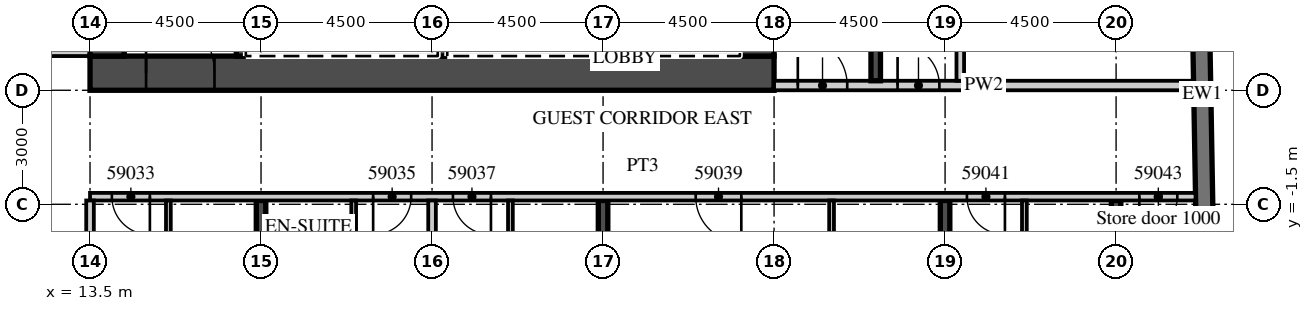
"""IFC4 building model, lengths in metres.
Left out: names, types, materials, properties, quantities, classifications, styles, units other than length and angle.
Written with IfcOpenShell. Run it as: python <this file> out.ifc"""

import sys

from ifc_helpers import new_model, si_unit, direction, frame, frame_2d, origin, place, context, subcontext, project, spatial, rectangle, extrude, element, fill, save


model = new_model("IFC4")
c1 = context("Model", 3, precision=1e-05, world=origin(), true_north=direction((0.0, 1.0)))
c2 = subcontext(c1, "Body", "Model", "MODEL_VIEW")
j1 = project(units=[si_unit("LENGTHUNIT", "METRE"), si_unit("PLANEANGLEUNIT", "RADIAN")], contexts=[c1])
p1 = place(None, origin())
s1 = spatial("IfcSite", under=j1, at=p1, CompositionType="ELEMENT")
p2 = place(p1, origin())
s2 = spatial("IfcBuilding", under=s1, at=p2, CompositionType="ELEMENT")
p3 = place(p2, frame((0.0, 0.0, 240.8)))
s3 = spatial("IfcBuildingStorey", under=s2, at=p3, CompositionType="ELEMENT", Elevation=240.8)
p4 = place(p3, frame((18.0, -19.079, 0.0), z_axis=(0.0, 0.0, 1.0), x_axis=(0.0, 1.0, 0.0)))
e1 = element("IfcWall", 1, at=p4, inside=s3, PredefinedType="SHEAR", context=c2, shape_type="SweptSolid", body=[
    extrude(rectangle(XDim=17.679, YDim=0.25, at=frame_2d((8.84, 0.0))), origin(), (0.0, 0.0, 1.0), 3.3),
])
p5 = place(p3, frame((27.0, -18.922, 0.0), z_axis=(0.0, 0.0, 1.0), x_axis=(0.0, 1.0, 0.0)))
e2 = element("IfcWall", 2, at=p5, inside=s3, PredefinedType="SHEAR", context=c2, shape_type="SweptSolid", body=[
    extrude(rectangle(XDim=17.522, YDim=0.25, at=frame_2d((8.761, 0.0))), origin(), (0.0, 0.0, 1.0), 3.3),
])
p6 = place(p3, frame((36.0, -18.765, 0.0), z_axis=(0.0, 0.0, 1.0), x_axis=(0.0, 1.0, 0.0)))
e3 = element("IfcWall", 3, at=p6, inside=s3, PredefinedType="SHEAR", context=c2, shape_type="SweptSolid", body=[
    extrude(rectangle(XDim=17.365, YDim=0.25, at=frame_2d((8.683, 0.0))), origin(), (0.0, 0.0, 1.0), 3.3),
])
p7 = place(p3, frame((40.5, -18.325, 0.0), z_axis=(0.0, 0.0, 1.0), x_axis=(0.0, 1.0, 0.0)))
e4 = element("IfcWall", 4, at=p7, inside=s3, PredefinedType="SHEAR", context=c2, shape_type="SweptSolid", body=[
    extrude(rectangle(XDim=16.925, YDim=0.25, at=frame_2d((8.463, 0.0))), origin(), (0.0, 0.0, 1.0), 3.3),
])
p8 = place(p3, frame((43.057, -15.103, 0.0), z_axis=(0.0, 0.0, 1.0), x_axis=(-0.017452408953, 0.999847695112, 0.0)))
e5 = element("IfcWall", 5, at=p8, inside=s3, PredefinedType="SOLIDWALL", context=c2, shape_type="SweptSolid", body=[
    extrude(rectangle(XDim=33.0, YDim=0.45, at=frame_2d((16.5, 0.0))), origin(), (0.0, 0.0, 1.0), 3.02),
])
p9 = place(p3, frame((-13.5, 2.5, 0.0), z_axis=(0.0, 0.0, 1.0), x_axis=(1.0, 0.0, 0.0)))
e6 = element("IfcWall", 6, at=p9, inside=s3, PredefinedType="PARTITIONING", context=c2, shape_type="SweptSolid", body=[
    extrude(rectangle(XDim=27.0, YDim=0.2, at=frame_2d((13.5, 0.0))), origin(), (0.0, 0.0, 1.0), 3.02),
])
p10 = place(p9, frame((2.925, 0.0, 0.0)))
e7 = element("IfcOpeningElement", 7, at=p10, cuts=e6, PredefinedType="OPENING", context=c2, shape_type="SweptSolid", body=[
    extrude(rectangle(XDim=1.0, YDim=2.1, at=frame_2d((0.5, 1.05))), frame((0.0, 0.11, 0.0), z_axis=(0.0, -1.0, 0.0), x_axis=(1.0, 0.0, 0.0)), (0.0, 0.0, 1.0), 0.22),
])
p11 = place(p9, frame((7.45, 0.0, 0.0)))
e8 = element("IfcOpeningElement", 8, at=p11, cuts=e6, PredefinedType="OPENING", context=c2, shape_type="SweptSolid", body=[
    extrude(rectangle(XDim=1.0, YDim=2.1, at=frame_2d((0.5, 1.05))), frame((0.0, 0.11, 0.0), z_axis=(0.0, -1.0, 0.0), x_axis=(1.0, 0.0, 0.0)), (0.0, 0.0, 1.0), 0.22),
])
p12 = place(p9, frame((11.925, 0.0, 0.0)))
e9 = element("IfcOpeningElement", 9, at=p12, cuts=e6, PredefinedType="OPENING", context=c2, shape_type="SweptSolid", body=[
    extrude(rectangle(XDim=1.0, YDim=2.1, at=frame_2d((0.5, 1.05))), frame((0.0, 0.11, 0.0), z_axis=(0.0, -1.0, 0.0), x_axis=(1.0, 0.0, 0.0)), (0.0, 0.0, 1.0), 0.22),
])
p13 = place(p9, frame((16.45, 0.0, 0.0)))
e10 = element("IfcOpeningElement", 10, at=p13, cuts=e6, PredefinedType="OPENING", context=c2, shape_type="SweptSolid", body=[
    extrude(rectangle(XDim=1.0, YDim=2.1, at=frame_2d((0.5, 1.05))), frame((0.0, 0.11, 0.0), z_axis=(0.0, -1.0, 0.0), x_axis=(1.0, 0.0, 0.0)), (0.0, 0.0, 1.0), 0.22),
])
p14 = place(p9, frame((18.55, 0.0, 0.0)))
e11 = element("IfcOpeningElement", 11, at=p14, cuts=e6, PredefinedType="OPENING", context=c2, shape_type="SweptSolid", body=[
    extrude(rectangle(XDim=1.0, YDim=2.1, at=frame_2d((0.5, 1.05))), frame((0.0, 0.11, 0.0), z_axis=(0.0, -1.0, 0.0), x_axis=(1.0, 0.0, 0.0)), (0.0, 0.0, 1.0), 0.22),
])
p15 = place(p9, frame((23.075, 0.0, 0.0)))
e12 = element("IfcOpeningElement", 12, at=p15, cuts=e6, PredefinedType="OPENING", context=c2, shape_type="SweptSolid", body=[
    extrude(rectangle(XDim=1.0, YDim=2.1, at=frame_2d((0.5, 1.05))), frame((0.0, 0.11, 0.0), z_axis=(0.0, -1.0, 0.0), x_axis=(1.0, 0.0, 0.0)), (0.0, 0.0, 1.0), 0.22),
])
p16 = place(p3, frame((13.5, -1.3, 0.0), z_axis=(0.0, 0.0, 1.0), x_axis=(1.0, 0.0, 0.0)))
e13 = element("IfcWall", 13, at=p16, inside=s3, PredefinedType="PARTITIONING", context=c2, shape_type="SweptSolid", body=[
    extrude(rectangle(XDim=29.091, YDim=0.2, at=frame_2d((14.545, 0.0))), origin(), (0.0, 0.0, 1.0), 3.02),
])
p17 = place(p16, frame((0.575, 0.0, 0.0)))
e14 = element("IfcOpeningElement", 14, at=p17, cuts=e13, PredefinedType="OPENING", context=c2, shape_type="SweptSolid", body=[
    extrude(rectangle(XDim=1.0, YDim=2.1, at=frame_2d((0.5, 1.05))), frame((0.0, 0.11, 0.0), z_axis=(0.0, -1.0, 0.0), x_axis=(1.0, 0.0, 0.0)), (0.0, 0.0, 1.0), 0.22),
])
p18 = place(p16, frame((7.45, 0.0, 0.0)))
e15 = element("IfcOpeningElement", 15, at=p18, cuts=e13, PredefinedType="OPENING", context=c2, shape_type="SweptSolid", body=[
    extrude(rectangle(XDim=1.0, YDim=2.1, at=frame_2d((0.5, 1.05))), frame((0.0, 0.11, 0.0), z_axis=(0.0, -1.0, 0.0), x_axis=(1.0, 0.0, 0.0)), (0.0, 0.0, 1.0), 0.22),
])
p19 = place(p16, frame((9.55, 0.0, 0.0)))
e16 = element("IfcOpeningElement", 16, at=p19, cuts=e13, PredefinedType="OPENING", context=c2, shape_type="SweptSolid", body=[
    extrude(rectangle(XDim=1.0, YDim=2.1, at=frame_2d((0.5, 1.05))), frame((0.0, 0.11, 0.0), z_axis=(0.0, -1.0, 0.0), x_axis=(1.0, 0.0, 0.0)), (0.0, 0.0, 1.0), 0.22),
])
p20 = place(p16, frame((15.938, 0.0, 0.0)))
e17 = element("IfcOpeningElement", 17, at=p20, cuts=e13, PredefinedType="OPENING", context=c2, shape_type="SweptSolid", body=[
    extrude(rectangle(XDim=1.2, YDim=2.1, at=frame_2d((0.6, 1.05))), frame((0.0, 0.11, 0.0), z_axis=(0.0, -1.0, 0.0), x_axis=(1.0, 0.0, 0.0)), (0.0, 0.0, 1.0), 0.22),
])
p21 = place(p16, frame((23.075, 0.0, 0.0)))
e18 = element("IfcOpeningElement", 18, at=p21, cuts=e13, PredefinedType="OPENING", context=c2, shape_type="SweptSolid", body=[
    extrude(rectangle(XDim=1.0, YDim=2.1, at=frame_2d((0.5, 1.05))), frame((0.0, 0.11, 0.0), z_axis=(0.0, -1.0, 0.0), x_axis=(1.0, 0.0, 0.0)), (0.0, 0.0, 1.0), 0.22),
])
p22 = place(p16, frame((27.611, 0.0, 0.0)))
e19 = element("IfcOpeningElement", 19, at=p22, cuts=e13, PredefinedType="OPENING", context=c2, shape_type="SweptSolid", body=[
    extrude(rectangle(XDim=1.0, YDim=2.4, at=frame_2d((0.5, 1.2))), frame((0.0, 0.11, 0.0), z_axis=(0.0, -1.0, 0.0), x_axis=(1.0, 0.0, 0.0)), (0.0, 0.0, 1.0), 0.22),
])
p23 = place(p3, frame((13.5, -19.17, 0.0), z_axis=(0.0, 0.0, 1.0), x_axis=(0.0, 1.0, 0.0)))
e20 = element("IfcWall", 20, at=p23, inside=s3, PredefinedType="PARTITIONING", context=c2, shape_type="SweptSolid", body=[
    extrude(rectangle(XDim=17.77, YDim=0.2, at=frame_2d((8.885, 0.0))), origin(), (0.0, 0.0, 1.0), 3.02),
])
p24 = place(p3, frame((15.562, -5.125, 0.0), z_axis=(0.0, 0.0, 1.0), x_axis=(0.0, 1.0, 0.0)))
e21 = element("IfcWall", 21, at=p24, inside=s3, PredefinedType="PARTITIONING", context=c2, shape_type="SweptSolid", body=[
    extrude(rectangle(XDim=3.725, YDim=0.125, at=frame_2d((1.863, 0.0))), origin(), (0.0, 0.0, 1.0), 3.02),
])
p25 = place(p24, frame((0.375, 0.0, 0.0)))
e22 = element("IfcOpeningElement", 22, at=p25, cuts=e21, PredefinedType="OPENING", context=c2, shape_type="SweptSolid", body=[
    extrude(rectangle(XDim=0.9, YDim=2.1, at=frame_2d((0.45, 1.05))), frame((0.0, 0.073, 0.0), z_axis=(0.0, -1.0, 0.0), x_axis=(1.0, 0.0, 0.0)), (0.0, 0.0, 1.0), 0.145),
])
p26 = place(p3, frame((22.5, -19.013, 0.0), z_axis=(0.0, 0.0, 1.0), x_axis=(0.0, 1.0, 0.0)))
e23 = element("IfcWall", 23, at=p26, inside=s3, PredefinedType="PARTITIONING", context=c2, shape_type="SweptSolid", body=[
    extrude(rectangle(XDim=17.613, YDim=0.2, at=frame_2d((8.807, 0.0))), origin(), (0.0, 0.0, 1.0), 3.02),
])
p27 = place(p3, frame((20.438, -5.125, 0.0), z_axis=(0.0, 0.0, 1.0), x_axis=(0.0, 1.0, 0.0)))
e24 = element("IfcWall", 24, at=p27, inside=s3, PredefinedType="PARTITIONING", context=c2, shape_type="SweptSolid", body=[
    extrude(rectangle(XDim=3.725, YDim=0.125, at=frame_2d((1.863, 0.0))), origin(), (0.0, 0.0, 1.0), 3.02),
])
p28 = place(p27, frame((0.375, 0.0, 0.0)))
e25 = element("IfcOpeningElement", 25, at=p28, cuts=e24, PredefinedType="OPENING", context=c2, shape_type="SweptSolid", body=[
    extrude(rectangle(XDim=0.9, YDim=2.1, at=frame_2d((0.45, 1.05))), frame((0.0, 0.073, 0.0), z_axis=(0.0, -1.0, 0.0), x_axis=(1.0, 0.0, 0.0)), (0.0, 0.0, 1.0), 0.145),
])
p29 = place(p3, frame((24.562, -5.125, 0.0), z_axis=(0.0, 0.0, 1.0), x_axis=(0.0, 1.0, 0.0)))
e26 = element("IfcWall", 26, at=p29, inside=s3, PredefinedType="PARTITIONING", context=c2, shape_type="SweptSolid", body=[
    extrude(rectangle(XDim=3.725, YDim=0.125, at=frame_2d((1.863, 0.0))), origin(), (0.0, 0.0, 1.0), 3.02),
])
p30 = place(p29, frame((0.375, 0.0, 0.0)))
e27 = element("IfcOpeningElement", 27, at=p30, cuts=e26, PredefinedType="OPENING", context=c2, shape_type="SweptSolid", body=[
    extrude(rectangle(XDim=0.9, YDim=2.1, at=frame_2d((0.45, 1.05))), frame((0.0, 0.073, 0.0), z_axis=(0.0, -1.0, 0.0), x_axis=(1.0, 0.0, 0.0)), (0.0, 0.0, 1.0), 0.145),
])
p31 = place(p3, frame((33.013, -5.125, 0.0), z_axis=(0.0, 0.0, 1.0), x_axis=(0.0, 1.0, 0.0)))
e28 = element("IfcWall", 28, at=p31, inside=s3, PredefinedType="PARTITIONING", context=c2, shape_type="SweptSolid", body=[
    extrude(rectangle(XDim=3.725, YDim=0.125, at=frame_2d((1.863, 0.0))), origin(), (0.0, 0.0, 1.0), 3.02),
])
p32 = place(p31, frame((0.375, 0.0, 0.0)))
e29 = element("IfcOpeningElement", 29, at=p32, cuts=e28, PredefinedType="OPENING", context=c2, shape_type="SweptSolid", body=[
    extrude(rectangle(XDim=0.9, YDim=2.1, at=frame_2d((0.45, 1.05))), frame((0.0, 0.073, 0.0), z_axis=(0.0, -1.0, 0.0), x_axis=(1.0, 0.0, 0.0)), (0.0, 0.0, 1.0), 0.145),
])
p33 = place(p3, frame((38.087, -5.125, 0.0), z_axis=(0.0, 0.0, 1.0), x_axis=(0.0, 1.0, 0.0)))
e30 = element("IfcWall", 30, at=p33, inside=s3, PredefinedType="PARTITIONING", context=c2, shape_type="SweptSolid", body=[
    extrude(rectangle(XDim=3.725, YDim=0.125, at=frame_2d((1.863, 0.0))), origin(), (0.0, 0.0, 1.0), 3.02),
])
p34 = place(p33, frame((0.375, 0.0, 0.0)))
e31 = element("IfcOpeningElement", 31, at=p34, cuts=e30, PredefinedType="OPENING", context=c2, shape_type="SweptSolid", body=[
    extrude(rectangle(XDim=0.9, YDim=2.1, at=frame_2d((0.45, 1.05))), frame((0.0, 0.073, 0.0), z_axis=(0.0, -1.0, 0.0), x_axis=(1.0, 0.0, 0.0)), (0.0, 0.0, 1.0), 0.145),
])
p35 = place(p3, frame((13.5, 1.95, 0.0), z_axis=(0.0, 0.0, 1.0), x_axis=(1.0, 0.0, 0.0)))
e32 = element("IfcWall", 32, at=p35, inside=s3, PredefinedType="SHEAR", context=c2, shape_type="SweptSolid", body=[
    extrude(rectangle(XDim=18.0, YDim=0.9, at=frame_2d((9.0, 0.0))), origin(), (0.0, 0.0, 1.0), 3.02),
])
p36 = place(p35, frame((1.475, 0.0, 0.0)))
e33 = element("IfcOpeningElement", 33, at=p36, cuts=e32, PredefinedType="OPENING", context=c2, shape_type="SweptSolid", body=[
    extrude(rectangle(XDim=1.8, YDim=2.1, at=frame_2d((0.9, 1.05))), frame((0.0, 0.46, 0.0), z_axis=(0.0, -1.0, 0.0), x_axis=(1.0, 0.0, 0.0)), (0.0, 0.0, 1.0), 0.92),
])
p37 = place(p3, frame((31.05, 2.4, 0.0), z_axis=(0.0, 0.0, 1.0), x_axis=(0.0, 1.0, 0.0)))
e34 = element("IfcWall", 34, at=p37, inside=s3, PredefinedType="SHEAR", context=c2, shape_type="SweptSolid", body=[
    extrude(rectangle(XDim=12.8, YDim=0.9, at=frame_2d((6.4, 0.0))), origin(), (0.0, 0.0, 1.0), 3.02),
])
p38 = place(p37, frame((0.2, 0.0, 0.0)))
e35 = element("IfcOpeningElement", 35, at=p38, cuts=e34, PredefinedType="OPENING", context=c2, shape_type="SweptSolid", body=[
    extrude(rectangle(XDim=1.1, YDim=2.1, at=frame_2d((0.55, 1.05))), frame((0.0, 0.46, 0.0), z_axis=(0.0, -1.0, 0.0), x_axis=(1.0, 0.0, 0.0)), (0.0, 0.0, 1.0), 0.92),
])
p39 = place(p3, frame((13.95, 2.4, 0.0), z_axis=(0.0, 0.0, 1.0), x_axis=(0.0, 1.0, 0.0)))
e36 = element("IfcWall", 36, at=p39, inside=s3, PredefinedType="SHEAR", context=c2, shape_type="SweptSolid", body=[
    extrude(rectangle(XDim=12.2, YDim=0.9, at=frame_2d((6.1, 0.0))), origin(), (0.0, 0.0, 1.0), 3.02),
])
p40 = place(p3, frame((17.475, 2.4, 0.0), z_axis=(0.0, 0.0, 1.0), x_axis=(0.0, 1.0, 0.0)))
e37 = element("IfcWall", 37, at=p40, inside=s3, PredefinedType="SHEAR", context=c2, shape_type="SweptSolid", body=[
    extrude(rectangle(XDim=3.15, YDim=0.25, at=frame_2d((1.575, 0.0))), origin(), (0.0, 0.0, 1.0), 3.02),
])
for number, where, z_axis, x_axis in (
    (38, (27.975, 2.4, 0.0), (0.0, 0.0, 1.0), (0.0, 1.0, 0.0)),
    (39, (22.775, 2.4, 0.0), (0.0, 0.0, 1.0), (0.0, 1.0, 0.0)),
):
    element("IfcWall", number, at=place(p3, frame(where, z_axis=z_axis, x_axis=x_axis)), inside=s3, PredefinedType="SHEAR", context=c2, shape_type="SweptSolid", body=[
        extrude(rectangle(XDim=2.9, YDim=0.25, at=frame_2d((1.45, 0.0))), origin(), (0.0, 0.0, 1.0), 3.02),
    ])
p41 = place(p3, frame((31.5, 1.625, 0.0), z_axis=(0.0, 0.0, 1.0), x_axis=(1.0, 0.0, 0.0)))
e40 = element("IfcWall", 40, at=p41, inside=s3, PredefinedType="PARTITIONING", context=c2, shape_type="SweptSolid", body=[
    extrude(rectangle(XDim=11.04, YDim=0.25, at=frame_2d((5.52, 0.0))), origin(), (0.0, 0.0, 1.0), 3.02),
])
p42 = place(p41, frame((0.625, 0.0, 0.0)))
e41 = element("IfcOpeningElement", 41, at=p42, cuts=e40, PredefinedType="OPENING", context=c2, shape_type="SweptSolid", body=[
    extrude(rectangle(XDim=1.3, YDim=2.1, at=frame_2d((0.65, 1.05))), frame((0.0, 0.135, 0.0), z_axis=(0.0, -1.0, 0.0), x_axis=(1.0, 0.0, 0.0)), (0.0, 0.0, 1.0), 0.27),
])
p43 = place(p41, frame((3.25, 0.0, 0.0)))
e42 = element("IfcOpeningElement", 42, at=p43, cuts=e40, PredefinedType="OPENING", context=c2, shape_type="SweptSolid", body=[
    extrude(rectangle(XDim=1.1, YDim=2.1, at=frame_2d((0.55, 1.05))), frame((0.0, 0.135, 0.0), z_axis=(0.0, -1.0, 0.0), x_axis=(1.0, 0.0, 0.0)), (0.0, 0.0, 1.0), 0.27),
])
p44 = place(p3, frame((34.175, 1.75, 0.0), z_axis=(0.0, 0.0, 1.0), x_axis=(0.0, 1.0, 0.0)))
e43 = element("IfcWall", 43, at=p44, inside=s3, PredefinedType="SHEAR", context=c2, shape_type="SweptSolid", body=[
    extrude(rectangle(XDim=8.35, YDim=0.25, at=frame_2d((4.175, 0.0))), origin(), (0.0, 0.0, 1.0), 3.02),
])
p45 = place(p3, frame((36.4, 1.75, 0.0), z_axis=(0.0, 0.0, 1.0), x_axis=(0.0, 1.0, 0.0)))
e44 = element("IfcWall", 44, at=p45, inside=s3, PredefinedType="PARTITIONING", context=c2, shape_type="SweptSolid", body=[
    extrude(rectangle(XDim=15.95, YDim=0.2, at=frame_2d((7.975, 0.0))), origin(), (0.0, 0.0, 1.0), 3.02),
])
p46 = place(p45, frame((14.7, 0.0, 0.0)))
e45 = element("IfcOpeningElement", 45, at=p46, cuts=e44, PredefinedType="OPENING", context=c2, shape_type="SweptSolid", body=[
    extrude(rectangle(XDim=0.9, YDim=2.1, at=frame_2d((0.45, 1.05))), frame((0.0, 0.11, 0.0), z_axis=(0.0, -1.0, 0.0), x_axis=(1.0, 0.0, 0.0)), (0.0, 0.0, 1.0), 0.22),
])
p47 = place(p17, origin())
e46 = element("IfcDoor", 46, at=p47, inside=s3, OperationType="SINGLE_SWING_RIGHT", PredefinedType="DOOR", context=c2, shape_type="SweptSolid", body=[
    extrude(rectangle(XDim=1.0, YDim=2.1, at=frame_2d((0.5, 1.05))), frame((0.0, 0.025, 0.0), z_axis=(0.0, -1.0, 0.0), x_axis=(1.0, 0.0, 0.0)), (0.0, 0.0, 1.0), 0.05),
])
fill(e14, e46)
p48 = place(p18, origin())
e47 = element("IfcDoor", 47, at=p48, inside=s3, OperationType="SINGLE_SWING_LEFT", PredefinedType="DOOR", context=c2, shape_type="SweptSolid", body=[
    extrude(rectangle(XDim=1.0, YDim=2.1, at=frame_2d((0.5, 1.05))), frame((0.0, 0.025, 0.0), z_axis=(0.0, -1.0, 0.0), x_axis=(1.0, 0.0, 0.0)), (0.0, 0.0, 1.0), 0.05),
])
fill(e15, e47)
p49 = place(p19, origin())
e48 = element("IfcDoor", 48, at=p49, inside=s3, OperationType="SINGLE_SWING_RIGHT", PredefinedType="DOOR", context=c2, shape_type="SweptSolid", body=[
    extrude(rectangle(XDim=1.0, YDim=2.1, at=frame_2d((0.5, 1.05))), frame((0.0, 0.025, 0.0), z_axis=(0.0, -1.0, 0.0), x_axis=(1.0, 0.0, 0.0)), (0.0, 0.0, 1.0), 0.05),
])
fill(e16, e48)
p50 = place(p20, origin())
e49 = element("IfcDoor", 49, at=p50, inside=s3, OperationType="SINGLE_SWING_RIGHT", PredefinedType="DOOR", context=c2, shape_type="SweptSolid", body=[
    extrude(rectangle(XDim=1.2, YDim=2.1, at=frame_2d((0.6, 1.05))), frame((0.0, 0.025, 0.0), z_axis=(0.0, -1.0, 0.0), x_axis=(1.0, 0.0, 0.0)), (0.0, 0.0, 1.0), 0.05),
])
fill(e17, e49)
p51 = place(p21, origin())
e50 = element("IfcDoor", 50, at=p51, inside=s3, OperationType="SINGLE_SWING_RIGHT", PredefinedType="DOOR", context=c2, shape_type="SweptSolid", body=[
    extrude(rectangle(XDim=1.0, YDim=2.1, at=frame_2d((0.5, 1.05))), frame((0.0, 0.025, 0.0), z_axis=(0.0, -1.0, 0.0), x_axis=(1.0, 0.0, 0.0)), (0.0, 0.0, 1.0), 0.05),
])
fill(e18, e50)
p52 = place(p22, origin())
e51 = element("IfcDoor", 51, at=p52, inside=s3, OperationType="SINGLE_SWING_LEFT", PredefinedType="DOOR", context=c2, shape_type="SweptSolid", body=[
    extrude(rectangle(XDim=1.0, YDim=2.4, at=frame_2d((0.5, 1.2))), frame((0.0, 0.025, 0.0), z_axis=(0.0, -1.0, 0.0), x_axis=(1.0, 0.0, 0.0)), (0.0, 0.0, 1.0), 0.05),
])
fill(e19, e51)
p53 = place(p36, origin())
e52 = element("IfcDoor", 52, at=p53, inside=s3, OperationType="DOUBLE_DOOR_DOUBLE_SWING", PredefinedType="DOOR", context=c2, shape_type="SweptSolid", body=[
    extrude(rectangle(XDim=1.8, YDim=2.1, at=frame_2d((0.9, 1.05))), frame((0.0, 0.025, 0.0), z_axis=(0.0, -1.0, 0.0), x_axis=(1.0, 0.0, 0.0)), (0.0, 0.0, 1.0), 0.05),
])
fill(e33, e52)
p54 = place(p42, origin())
e53 = element("IfcDoor", 53, at=p54, inside=s3, OperationType="SINGLE_SWING_LEFT", PredefinedType="DOOR", context=c2, shape_type="SweptSolid", body=[
    extrude(rectangle(XDim=1.3, YDim=2.1, at=frame_2d((0.65, 1.05))), frame((0.0, 0.025, 0.0), z_axis=(0.0, -1.0, 0.0), x_axis=(1.0, 0.0, 0.0)), (0.0, 0.0, 1.0), 0.05),
])
fill(e41, e53)
p55 = place(p43, origin())
e54 = element("IfcDoor", 54, at=p55, inside=s3, OperationType="SINGLE_SWING_LEFT", PredefinedType="DOOR", context=c2, shape_type="SweptSolid", body=[
    extrude(rectangle(XDim=1.1, YDim=2.1, at=frame_2d((0.55, 1.05))), frame((0.0, 0.025, 0.0), z_axis=(0.0, -1.0, 0.0), x_axis=(1.0, 0.0, 0.0)), (0.0, 0.0, 1.0), 0.05),
])
fill(e42, e54)
save(model, sys.argv[1])
